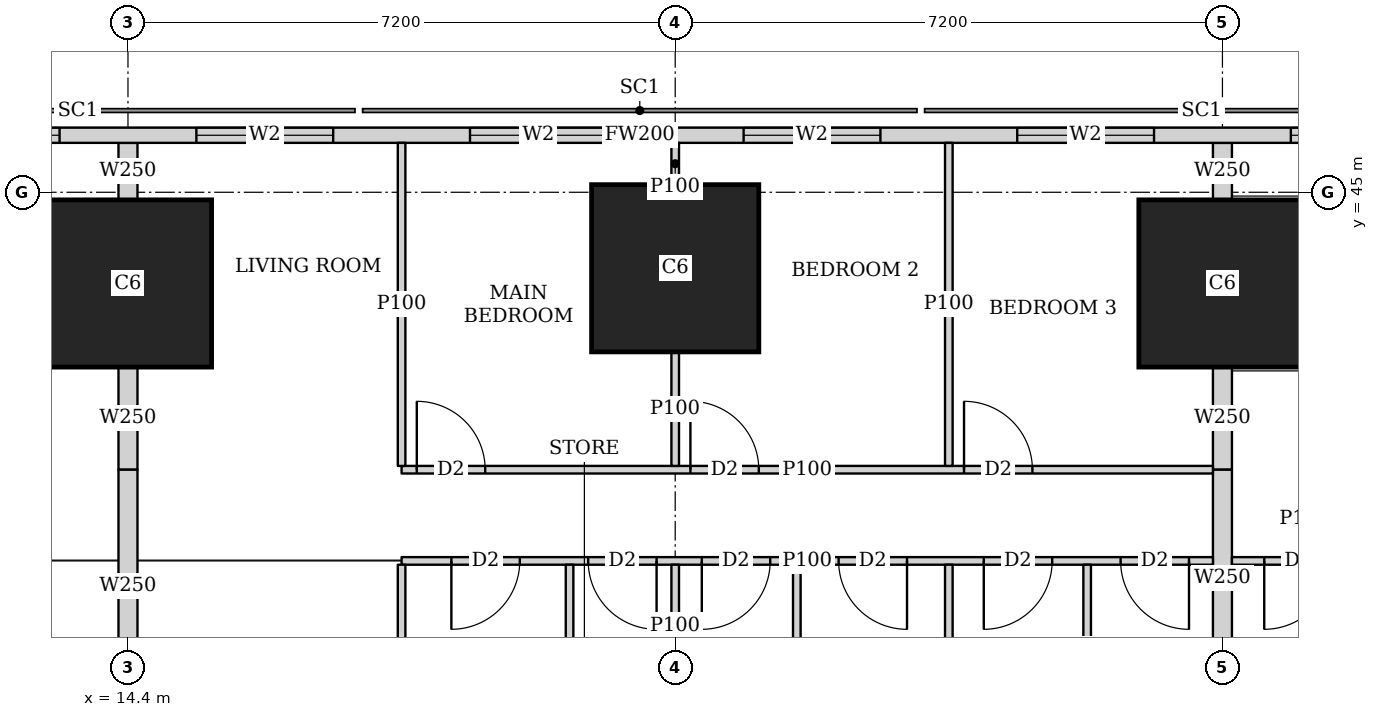
"""IFC4 building model, lengths in metres.
Left out: names, types, materials, properties, quantities, classifications, styles, units other than length and angle.
Written with IfcOpenShell. Run it as: python <this file> out.ifc"""

import sys

from ifc_helpers import new_model, si_unit, direction, frame, frame_2d, origin, origin_2d, place, context, subcontext, project, spatial, rectangle, extrude, element, fill, save


model = new_model("IFC4")
c1 = context("Model", 3, precision=1e-05, world=origin(), true_north=direction((0.0, 1.0)))
c2 = subcontext(c1, "Body", "Model", "MODEL_VIEW")
j1 = project(units=[si_unit("LENGTHUNIT", "METRE"), si_unit("PLANEANGLEUNIT", "RADIAN")], contexts=[c1])
p1 = place(None, origin())
s1 = spatial("IfcSite", under=j1, at=p1, CompositionType="ELEMENT")
p2 = place(p1, origin())
s2 = spatial("IfcBuilding", under=s1, at=p2, CompositionType="ELEMENT")
p3 = place(p2, frame((0.0, 0.0, 77.9)))
s3 = spatial("IfcBuildingStorey", under=s2, at=p3, CompositionType="ELEMENT", Elevation=77.9)
for number, where, z_axis, x_axis in (
    (1, (14.4, 43.8, 0.0), (0.0, 0.0, 1.0), (1.0, 0.0, 0.0)),
    (2, (21.6, 44.0, 0.0), (0.0, 0.0, 1.0), (1.0, 0.0, 0.0)),
    (3, (28.8, 43.8, 0.0), (0.0, 0.0, 1.0), (1.0, 0.0, 0.0)),
):
    element("IfcColumn", number, at=place(p3, frame(where, z_axis=z_axis, x_axis=x_axis)), inside=s3, PredefinedType="COLUMN", context=c2, shape_type="SweptSolid", body=[
        extrude(rectangle(XDim=2.2, YDim=2.2, at=origin_2d()), origin(), (0.0, 0.0, 1.0), 3.75),
    ])
p4 = place(p3, frame((40.106, 45.75, 0.0), z_axis=(0.0, 0.0, 1.0), x_axis=(-1.0, 0.0, 0.0)))
e4 = element("IfcWall", 4, at=p4, inside=s3, PredefinedType="SOLIDWALL", context=c2, shape_type="SweptSolid", body=[
    extrude(rectangle(XDim=37.943, YDim=0.2, at=frame_2d((18.971, 0.0))), origin(), (0.0, 0.0, 1.0), 3.5),
])
p5 = place(p4, frame((8.606, 0.0, 0.9)))
e5 = element("IfcOpeningElement", 5, at=p5, cuts=e4, PredefinedType="OPENING", context=c2, shape_type="SweptSolid", body=[
    extrude(rectangle(XDim=1.8, YDim=1.5, at=frame_2d((0.9, 0.75))), frame((0.0, 0.11, 0.0), z_axis=(0.0, -1.0, 0.0), x_axis=(1.0, 0.0, 0.0)), (0.0, 0.0, 1.0), 0.22),
])
p6 = place(p4, frame((12.206, 0.0, 0.9)))
e6 = element("IfcOpeningElement", 6, at=p6, cuts=e4, PredefinedType="OPENING", context=c2, shape_type="SweptSolid", body=[
    extrude(rectangle(XDim=1.8, YDim=1.5, at=frame_2d((0.9, 0.75))), frame((0.0, 0.11, 0.0), z_axis=(0.0, -1.0, 0.0), x_axis=(1.0, 0.0, 0.0)), (0.0, 0.0, 1.0), 0.22),
])
p7 = place(p4, frame((15.806, 0.0, 0.9)))
e7 = element("IfcOpeningElement", 7, at=p7, cuts=e4, PredefinedType="OPENING", context=c2, shape_type="SweptSolid", body=[
    extrude(rectangle(XDim=1.8, YDim=1.5, at=frame_2d((0.9, 0.75))), frame((0.0, 0.11, 0.0), z_axis=(0.0, -1.0, 0.0), x_axis=(1.0, 0.0, 0.0)), (0.0, 0.0, 1.0), 0.22),
])
p8 = place(p4, frame((19.406, 0.0, 0.9)))
e8 = element("IfcOpeningElement", 8, at=p8, cuts=e4, PredefinedType="OPENING", context=c2, shape_type="SweptSolid", body=[
    extrude(rectangle(XDim=1.8, YDim=1.5, at=frame_2d((0.9, 0.75))), frame((0.0, 0.11, 0.0), z_axis=(0.0, -1.0, 0.0), x_axis=(1.0, 0.0, 0.0)), (0.0, 0.0, 1.0), 0.22),
])
p9 = place(p4, frame((23.006, 0.0, 0.9)))
e9 = element("IfcOpeningElement", 9, at=p9, cuts=e4, PredefinedType="OPENING", context=c2, shape_type="SweptSolid", body=[
    extrude(rectangle(XDim=1.8, YDim=1.5, at=frame_2d((0.9, 0.75))), frame((0.0, 0.11, 0.0), z_axis=(0.0, -1.0, 0.0), x_axis=(1.0, 0.0, 0.0)), (0.0, 0.0, 1.0), 0.22),
])
p10 = place(p4, frame((26.606, 0.0, 0.9)))
e10 = element("IfcOpeningElement", 10, at=p10, cuts=e4, PredefinedType="OPENING", context=c2, shape_type="SweptSolid", body=[
    extrude(rectangle(XDim=1.8, YDim=1.5, at=frame_2d((0.9, 0.75))), frame((0.0, 0.11, 0.0), z_axis=(0.0, -1.0, 0.0), x_axis=(1.0, 0.0, 0.0)), (0.0, 0.0, 1.0), 0.22),
])
p11 = place(p3, frame((18.0, 41.35, 0.0), z_axis=(0.0, 0.0, 1.0), x_axis=(1.0, 0.0, 0.0)))
e11 = element("IfcWall", 11, at=p11, inside=s3, PredefinedType="PARTITIONING", context=c2, shape_type="SweptSolid", body=[
    extrude(rectangle(XDim=10.675, YDim=0.1, at=frame_2d((5.337, 0.0))), origin(), (0.0, 0.0, 1.0), 3.5),
])
p12 = place(p11, frame((0.2, 0.0, 0.0)))
e12 = element("IfcOpeningElement", 12, at=p12, cuts=e11, PredefinedType="OPENING", context=c2, shape_type="SweptSolid", body=[
    extrude(rectangle(XDim=0.9, YDim=2.1, at=frame_2d((0.45, 1.05))), frame((0.0, 0.06, 0.0), z_axis=(0.0, -1.0, 0.0), x_axis=(1.0, 0.0, 0.0)), (0.0, 0.0, 1.0), 0.12),
])
p13 = place(p11, frame((3.8, 0.0, 0.0)))
e13 = element("IfcOpeningElement", 13, at=p13, cuts=e11, PredefinedType="OPENING", context=c2, shape_type="SweptSolid", body=[
    extrude(rectangle(XDim=0.9, YDim=2.1, at=frame_2d((0.45, 1.05))), frame((0.0, 0.06, 0.0), z_axis=(0.0, -1.0, 0.0), x_axis=(1.0, 0.0, 0.0)), (0.0, 0.0, 1.0), 0.12),
])
p14 = place(p11, frame((7.4, 0.0, 0.0)))
e14 = element("IfcOpeningElement", 14, at=p14, cuts=e11, PredefinedType="OPENING", context=c2, shape_type="SweptSolid", body=[
    extrude(rectangle(XDim=0.9, YDim=2.1, at=frame_2d((0.45, 1.05))), frame((0.0, 0.06, 0.0), z_axis=(0.0, -1.0, 0.0), x_axis=(1.0, 0.0, 0.0)), (0.0, 0.0, 1.0), 0.12),
])
p15 = place(p3, frame((18.0, 40.15, 0.0), z_axis=(0.0, 0.0, 1.0), x_axis=(1.0, 0.0, 0.0)))
e15 = element("IfcWall", 15, at=p15, inside=s3, PredefinedType="PARTITIONING", context=c2, shape_type="SweptSolid", body=[
    extrude(rectangle(XDim=10.675, YDim=0.1, at=frame_2d((5.337, 0.0))), origin(), (0.0, 0.0, 1.0), 3.5),
])
p16 = place(p15, frame((0.655, 0.0, 0.0)))
e16 = element("IfcOpeningElement", 16, at=p16, cuts=e15, PredefinedType="OPENING", context=c2, shape_type="SweptSolid", body=[
    extrude(rectangle(XDim=0.9, YDim=2.1, at=frame_2d((0.45, 1.05))), frame((0.0, 0.06, 0.0), z_axis=(0.0, -1.0, 0.0), x_axis=(1.0, 0.0, 0.0)), (0.0, 0.0, 1.0), 0.12),
])
p17 = place(p15, frame((3.95, 0.0, 0.0)))
e17 = element("IfcOpeningElement", 17, at=p17, cuts=e15, PredefinedType="OPENING", context=c2, shape_type="SweptSolid", body=[
    extrude(rectangle(XDim=0.9, YDim=2.1, at=frame_2d((0.45, 1.05))), frame((0.0, 0.06, 0.0), z_axis=(0.0, -1.0, 0.0), x_axis=(1.0, 0.0, 0.0)), (0.0, 0.0, 1.0), 0.12),
])
p18 = place(p15, frame((7.66, 0.0, 0.0)))
e18 = element("IfcOpeningElement", 18, at=p18, cuts=e15, PredefinedType="OPENING", context=c2, shape_type="SweptSolid", body=[
    extrude(rectangle(XDim=0.9, YDim=2.1, at=frame_2d((0.45, 1.05))), frame((0.0, 0.06, 0.0), z_axis=(0.0, -1.0, 0.0), x_axis=(1.0, 0.0, 0.0)), (0.0, 0.0, 1.0), 0.12),
])
p19 = place(p15, frame((2.455, 0.0, 0.0)))
e19 = element("IfcOpeningElement", 19, at=p19, cuts=e15, PredefinedType="OPENING", context=c2, shape_type="SweptSolid", body=[
    extrude(rectangle(XDim=0.9, YDim=2.1, at=frame_2d((0.45, 1.05))), frame((0.0, 0.06, 0.0), z_axis=(0.0, -1.0, 0.0), x_axis=(1.0, 0.0, 0.0)), (0.0, 0.0, 1.0), 0.12),
])
p20 = place(p15, frame((5.75, 0.0, 0.0)))
e20 = element("IfcOpeningElement", 20, at=p20, cuts=e15, PredefinedType="OPENING", context=c2, shape_type="SweptSolid", body=[
    extrude(rectangle(XDim=0.9, YDim=2.1, at=frame_2d((0.45, 1.05))), frame((0.0, 0.06, 0.0), z_axis=(0.0, -1.0, 0.0), x_axis=(1.0, 0.0, 0.0)), (0.0, 0.0, 1.0), 0.12),
])
p21 = place(p15, frame((9.46, 0.0, 0.0)))
e21 = element("IfcOpeningElement", 21, at=p21, cuts=e15, PredefinedType="OPENING", context=c2, shape_type="SweptSolid", body=[
    extrude(rectangle(XDim=0.9, YDim=2.1, at=frame_2d((0.45, 1.05))), frame((0.0, 0.06, 0.0), z_axis=(0.0, -1.0, 0.0), x_axis=(1.0, 0.0, 0.0)), (0.0, 0.0, 1.0), 0.12),
])
p22 = place(p3, frame((18.0, 41.4, 0.0), z_axis=(0.0, 0.0, 1.0), x_axis=(0.0, 1.0, 0.0)))
e22 = element("IfcWall", 22, at=p22, inside=s3, PredefinedType="PARTITIONING", context=c2, shape_type="SweptSolid", body=[
    extrude(rectangle(XDim=4.25, YDim=0.1, at=frame_2d((2.125, 0.0))), origin(), (0.0, 0.0, 1.0), 2.2),
])
p23 = place(p3, frame((21.6, 41.4, 0.0), z_axis=(0.0, 0.0, 1.0), x_axis=(0.0, 1.0, 0.0)))
e23 = element("IfcWall", 23, at=p23, inside=s3, PredefinedType="PARTITIONING", context=c2, shape_type="SweptSolid", body=[
    extrude(rectangle(XDim=1.499, YDim=0.1, at=frame_2d((0.75, 0.0))), origin(), (0.0, 0.0, 1.0), 3.5),
])
p24 = place(p3, frame((21.6, 45.101, 0.0), z_axis=(0.0, 0.0, 1.0), x_axis=(0.0, 1.0, 0.0)))
e24 = element("IfcWall", 24, at=p24, inside=s3, PredefinedType="PARTITIONING", context=c2, shape_type="SweptSolid", body=[
    extrude(rectangle(XDim=0.549, YDim=0.1, at=frame_2d((0.274, 0.0))), origin(), (0.0, 0.0, 1.0), 3.5),
])
p25 = place(p3, frame((25.2, 41.4, 0.0), z_axis=(0.0, 0.0, 1.0), x_axis=(0.0, 1.0, 0.0)))
e25 = element("IfcWall", 25, at=p25, inside=s3, PredefinedType="PARTITIONING", context=c2, shape_type="SweptSolid", body=[
    extrude(rectangle(XDim=4.25, YDim=0.1, at=frame_2d((2.125, 0.0))), origin(), (0.0, 0.0, 1.0), 2.2),
])
p26 = place(p3, frame((18.0, 36.825, 0.0), z_axis=(0.0, 0.0, 1.0), x_axis=(0.0, 1.0, 0.0)))
e26 = element("IfcWall", 26, at=p26, inside=s3, PredefinedType="PARTITIONING", context=c2, shape_type="SweptSolid", body=[
    extrude(rectangle(XDim=3.275, YDim=0.1, at=frame_2d((1.638, 0.0))), origin(), (0.0, 0.0, 1.0), 3.5),
])
p27 = place(p3, frame((21.6, 38.501, 0.0), z_axis=(0.0, 0.0, 1.0), x_axis=(0.0, 1.0, 0.0)))
e27 = element("IfcWall", 27, at=p27, inside=s3, PredefinedType="PARTITIONING", context=c2, shape_type="SweptSolid", body=[
    extrude(rectangle(XDim=1.599, YDim=0.1, at=frame_2d((0.8, 0.0))), origin(), (0.0, 0.0, 1.0), 3.5),
])
for number, where, z_axis, x_axis in (
    (28, (25.2, 36.825, 0.0), (0.0, 0.0, 1.0), (0.0, 1.0, 0.0)),
    (29, (20.21, 36.825, 0.0), (0.0, 0.0, 1.0), (0.0, 1.0, 0.0)),
    (30, (23.2, 36.825, 0.0), (0.0, 0.0, 1.0), (0.0, 1.0, 0.0)),
    (31, (27.02, 36.825, 0.0), (0.0, 0.0, 1.0), (0.0, 1.0, 0.0)),
):
    element("IfcWall", number, at=place(p3, frame(where, z_axis=z_axis, x_axis=x_axis)), inside=s3, PredefinedType="PARTITIONING", context=c2, shape_type="SweptSolid", body=[
        extrude(rectangle(XDim=3.275, YDim=0.1, at=frame_2d((1.638, 0.0))), origin(), (0.0, 0.0, 1.0), 3.5),
    ])
p28 = place(p3, frame((14.4, 41.35, 0.0), z_axis=(0.0, 0.0, 1.0), x_axis=(0.0, 1.0, 0.0)))
e32 = element("IfcWall", 32, at=p28, inside=s3, PredefinedType="SOLIDWALL", context=c2, shape_type="SweptSolid", body=[
    extrude(rectangle(XDim=1.349, YDim=0.25, at=frame_2d((0.674, 0.0))), origin(), (0.0, 0.0, 1.0), 3.5),
])
p29 = place(p3, frame((14.4, 44.901, 0.0), z_axis=(0.0, 0.0, 1.0), x_axis=(0.0, 1.0, 0.0)))
e33 = element("IfcWall", 33, at=p29, inside=s3, PredefinedType="SOLIDWALL", context=c2, shape_type="SweptSolid", body=[
    extrude(rectangle(XDim=0.749, YDim=0.25, at=frame_2d((0.375, 0.0))), origin(), (0.0, 0.0, 1.0), 3.5),
])
p30 = place(p3, frame((14.4, 38.301, 0.0), z_axis=(0.0, 0.0, 1.0), x_axis=(0.0, 1.0, 0.0)))
e34 = element("IfcWall", 34, at=p30, inside=s3, PredefinedType="SOLIDWALL", context=c2, shape_type="SweptSolid", body=[
    extrude(rectangle(XDim=3.049, YDim=0.25, at=frame_2d((1.524, 0.0))), origin(), (0.0, 0.0, 1.0), 3.5),
])
p31 = place(p3, frame((28.925, 40.15, 0.0), z_axis=(0.0, 0.0, 1.0), x_axis=(1.0, 0.0, 0.0)))
e35 = element("IfcWall", 35, at=p31, inside=s3, PredefinedType="PARTITIONING", context=c2, shape_type="SweptSolid", body=[
    extrude(rectangle(XDim=1.904, YDim=0.1, at=frame_2d((0.952, 0.0))), origin(), (0.0, 0.0, 1.0), 3.5),
])
p32 = place(p31, frame((0.425, 0.0, 0.0)))
e36 = element("IfcOpeningElement", 36, at=p32, cuts=e35, PredefinedType="OPENING", context=c2, shape_type="SweptSolid", body=[
    extrude(rectangle(XDim=0.9, YDim=2.1, at=frame_2d((0.45, 1.05))), frame((0.0, 0.06, 0.0), z_axis=(0.0, -1.0, 0.0), x_axis=(1.0, 0.0, 0.0)), (0.0, 0.0, 1.0), 0.12),
])
p33 = place(p3, frame((28.8, 41.35, 0.0), z_axis=(0.0, 0.0, 1.0), x_axis=(0.0, 1.0, 0.0)))
e37 = element("IfcWall", 37, at=p33, inside=s3, PredefinedType="SOLIDWALL", context=c2, shape_type="SweptSolid", body=[
    extrude(rectangle(XDim=1.349, YDim=0.25, at=frame_2d((0.674, 0.0))), origin(), (0.0, 0.0, 1.0), 3.5),
])
p34 = place(p3, frame((28.8, 44.901, 0.0), z_axis=(0.0, 0.0, 1.0), x_axis=(0.0, 1.0, 0.0)))
e38 = element("IfcWall", 38, at=p34, inside=s3, PredefinedType="SOLIDWALL", context=c2, shape_type="SweptSolid", body=[
    extrude(rectangle(XDim=0.749, YDim=0.25, at=frame_2d((0.375, 0.0))), origin(), (0.0, 0.0, 1.0), 3.5),
])
p35 = place(p3, frame((28.8, 38.501, 0.0), z_axis=(0.0, 0.0, 1.0), x_axis=(0.0, 1.0, 0.0)))
e39 = element("IfcWall", 39, at=p35, inside=s3, PredefinedType="SOLIDWALL", context=c2, shape_type="SweptSolid", body=[
    extrude(rectangle(XDim=2.849, YDim=0.25, at=frame_2d((1.425, 0.0))), origin(), (0.0, 0.0, 1.0), 3.5),
])
p36 = place(p5, origin())
e40 = element("IfcWindow", 40, at=p36, inside=s3, PartitioningType="SINGLE_PANEL", PredefinedType="WINDOW", context=c2, shape_type="SweptSolid", body=[
    extrude(rectangle(XDim=1.8, YDim=1.5, at=frame_2d((0.9, 0.75))), frame((0.0, 0.03, 0.0), z_axis=(0.0, -1.0, 0.0), x_axis=(1.0, 0.0, 0.0)), (0.0, 0.0, 1.0), 0.06),
])
fill(e5, e40)
p37 = place(p6, origin())
e41 = element("IfcWindow", 41, at=p37, inside=s3, PartitioningType="SINGLE_PANEL", PredefinedType="WINDOW", context=c2, shape_type="SweptSolid", body=[
    extrude(rectangle(XDim=1.8, YDim=1.5, at=frame_2d((0.9, 0.75))), frame((0.0, 0.03, 0.0), z_axis=(0.0, -1.0, 0.0), x_axis=(1.0, 0.0, 0.0)), (0.0, 0.0, 1.0), 0.06),
])
fill(e6, e41)
p38 = place(p7, origin())
e42 = element("IfcWindow", 42, at=p38, inside=s3, PartitioningType="SINGLE_PANEL", PredefinedType="WINDOW", context=c2, shape_type="SweptSolid", body=[
    extrude(rectangle(XDim=1.8, YDim=1.5, at=frame_2d((0.9, 0.75))), frame((0.0, 0.03, 0.0), z_axis=(0.0, -1.0, 0.0), x_axis=(1.0, 0.0, 0.0)), (0.0, 0.0, 1.0), 0.06),
])
fill(e7, e42)
p39 = place(p8, origin())
e43 = element("IfcWindow", 43, at=p39, inside=s3, PartitioningType="SINGLE_PANEL", PredefinedType="WINDOW", context=c2, shape_type="SweptSolid", body=[
    extrude(rectangle(XDim=1.8, YDim=1.5, at=frame_2d((0.9, 0.75))), frame((0.0, 0.03, 0.0), z_axis=(0.0, -1.0, 0.0), x_axis=(1.0, 0.0, 0.0)), (0.0, 0.0, 1.0), 0.06),
])
fill(e8, e43)
p40 = place(p9, origin())
e44 = element("IfcWindow", 44, at=p40, inside=s3, PartitioningType="SINGLE_PANEL", PredefinedType="WINDOW", context=c2, shape_type="SweptSolid", body=[
    extrude(rectangle(XDim=1.8, YDim=1.5, at=frame_2d((0.9, 0.75))), frame((0.0, 0.03, 0.0), z_axis=(0.0, -1.0, 0.0), x_axis=(1.0, 0.0, 0.0)), (0.0, 0.0, 1.0), 0.06),
])
fill(e9, e44)
p41 = place(p10, origin())
e45 = element("IfcWindow", 45, at=p41, inside=s3, PartitioningType="SINGLE_PANEL", PredefinedType="WINDOW", context=c2, shape_type="SweptSolid", body=[
    extrude(rectangle(XDim=1.8, YDim=1.5, at=frame_2d((0.9, 0.75))), frame((0.0, 0.03, 0.0), z_axis=(0.0, -1.0, 0.0), x_axis=(1.0, 0.0, 0.0)), (0.0, 0.0, 1.0), 0.06),
])
fill(e10, e45)
p42 = place(p12, origin())
e46 = element("IfcDoor", 46, at=p42, inside=s3, OperationType="SINGLE_SWING_LEFT", PredefinedType="DOOR", context=c2, shape_type="SweptSolid", body=[
    extrude(rectangle(XDim=0.9, YDim=2.1, at=frame_2d((0.45, 1.05))), frame((0.0, 0.025, 0.0), z_axis=(0.0, -1.0, 0.0), x_axis=(1.0, 0.0, 0.0)), (0.0, 0.0, 1.0), 0.05),
])
fill(e12, e46)
p43 = place(p13, origin())
e47 = element("IfcDoor", 47, at=p43, inside=s3, OperationType="SINGLE_SWING_LEFT", PredefinedType="DOOR", context=c2, shape_type="SweptSolid", body=[
    extrude(rectangle(XDim=0.9, YDim=2.1, at=frame_2d((0.45, 1.05))), frame((0.0, 0.025, 0.0), z_axis=(0.0, -1.0, 0.0), x_axis=(1.0, 0.0, 0.0)), (0.0, 0.0, 1.0), 0.05),
])
fill(e13, e47)
p44 = place(p14, origin())
e48 = element("IfcDoor", 48, at=p44, inside=s3, OperationType="SINGLE_SWING_LEFT", PredefinedType="DOOR", context=c2, shape_type="SweptSolid", body=[
    extrude(rectangle(XDim=0.9, YDim=2.1, at=frame_2d((0.45, 1.05))), frame((0.0, 0.025, 0.0), z_axis=(0.0, -1.0, 0.0), x_axis=(1.0, 0.0, 0.0)), (0.0, 0.0, 1.0), 0.05),
])
fill(e14, e48)
p45 = place(p16, origin())
e49 = element("IfcDoor", 49, at=p45, inside=s3, OperationType="SINGLE_SWING_RIGHT", PredefinedType="DOOR", context=c2, shape_type="SweptSolid", body=[
    extrude(rectangle(XDim=0.9, YDim=2.1, at=frame_2d((0.45, 1.05))), frame((0.0, 0.025, 0.0), z_axis=(0.0, -1.0, 0.0), x_axis=(1.0, 0.0, 0.0)), (0.0, 0.0, 1.0), 0.05),
])
fill(e16, e49)
p46 = place(p17, origin())
e50 = element("IfcDoor", 50, at=p46, inside=s3, OperationType="SINGLE_SWING_RIGHT", PredefinedType="DOOR", context=c2, shape_type="SweptSolid", body=[
    extrude(rectangle(XDim=0.9, YDim=2.1, at=frame_2d((0.45, 1.05))), frame((0.0, 0.025, 0.0), z_axis=(0.0, -1.0, 0.0), x_axis=(1.0, 0.0, 0.0)), (0.0, 0.0, 1.0), 0.05),
])
fill(e17, e50)
p47 = place(p18, origin())
e51 = element("IfcDoor", 51, at=p47, inside=s3, OperationType="SINGLE_SWING_RIGHT", PredefinedType="DOOR", context=c2, shape_type="SweptSolid", body=[
    extrude(rectangle(XDim=0.9, YDim=2.1, at=frame_2d((0.45, 1.05))), frame((0.0, 0.025, 0.0), z_axis=(0.0, -1.0, 0.0), x_axis=(1.0, 0.0, 0.0)), (0.0, 0.0, 1.0), 0.05),
])
fill(e18, e51)
p48 = place(p19, origin())
e52 = element("IfcDoor", 52, at=p48, inside=s3, OperationType="SINGLE_SWING_LEFT", PredefinedType="DOOR", context=c2, shape_type="SweptSolid", body=[
    extrude(rectangle(XDim=0.9, YDim=2.1, at=frame_2d((0.45, 1.05))), frame((0.0, 0.025, 0.0), z_axis=(0.0, -1.0, 0.0), x_axis=(1.0, 0.0, 0.0)), (0.0, 0.0, 1.0), 0.05),
])
fill(e19, e52)
p49 = place(p20, origin())
e53 = element("IfcDoor", 53, at=p49, inside=s3, OperationType="SINGLE_SWING_LEFT", PredefinedType="DOOR", context=c2, shape_type="SweptSolid", body=[
    extrude(rectangle(XDim=0.9, YDim=2.1, at=frame_2d((0.45, 1.05))), frame((0.0, 0.025, 0.0), z_axis=(0.0, -1.0, 0.0), x_axis=(1.0, 0.0, 0.0)), (0.0, 0.0, 1.0), 0.05),
])
fill(e20, e53)
p50 = place(p21, origin())
e54 = element("IfcDoor", 54, at=p50, inside=s3, OperationType="SINGLE_SWING_LEFT", PredefinedType="DOOR", context=c2, shape_type="SweptSolid", body=[
    extrude(rectangle(XDim=0.9, YDim=2.1, at=frame_2d((0.45, 1.05))), frame((0.0, 0.025, 0.0), z_axis=(0.0, -1.0, 0.0), x_axis=(1.0, 0.0, 0.0)), (0.0, 0.0, 1.0), 0.05),
])
fill(e21, e54)
p51 = place(p32, origin())
e55 = element("IfcDoor", 55, at=p51, inside=s3, OperationType="SINGLE_SWING_RIGHT", PredefinedType="DOOR", context=c2, shape_type="SweptSolid", body=[
    extrude(rectangle(XDim=0.9, YDim=2.1, at=frame_2d((0.45, 1.05))), frame((0.0, 0.025, 0.0), z_axis=(0.0, -1.0, 0.0), x_axis=(1.0, 0.0, 0.0)), (0.0, 0.0, 1.0), 0.05),
])
fill(e36, e55)
save(model, sys.argv[1])
